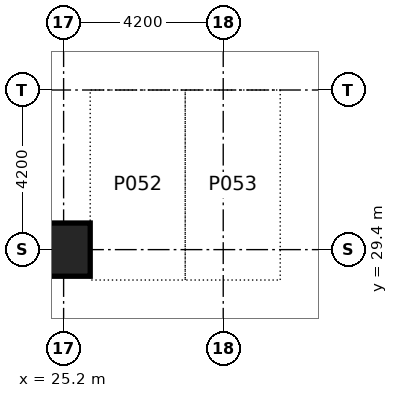
"""IFC4 building model, lengths in metres.
Left out: names, types, materials, properties, quantities, classifications, styles, units other than length and angle.
Written with IfcOpenShell. Run it as: python <this file> out.ifc"""

import sys

from ifc_helpers import new_model, si_unit, direction, frame, origin, origin_2d, place, context, subcontext, project, spatial, rectangle, extrude, element, save


model = new_model("IFC4")
c1 = context("Model", 3, precision=1e-05, world=origin(), true_north=direction((0.0, 1.0)))
c2 = subcontext(c1, "Body", "Model", "MODEL_VIEW")
j1 = project(units=[si_unit("LENGTHUNIT", "METRE"), si_unit("PLANEANGLEUNIT", "RADIAN")], contexts=[c1])
p1 = place(None, origin())
s1 = spatial("IfcSite", under=j1, at=p1, CompositionType="ELEMENT")
p2 = place(p1, origin())
s2 = spatial("IfcBuilding", under=s1, at=p2, CompositionType="ELEMENT")
p3 = place(p2, frame((0.0, 0.0, -4.2)))
s3 = spatial("IfcBuildingStorey", under=s2, at=p3, CompositionType="ELEMENT", Elevation=-4.2)
p4 = place(p3, frame((25.2, 29.4, 0.0), z_axis=(0.0, 0.0, 1.0), x_axis=(1.0, 0.0, 0.0)))
e1 = element("IfcColumn", 1, at=p4, inside=s3, PredefinedType="COLUMN", context=c2, shape_type="SweptSolid", body=[
    extrude(rectangle(XDim=1.4, YDim=1.4, at=origin_2d()), origin(), (0.0, 0.0, 1.0), 4.2),
])
save(model, sys.argv[1])
